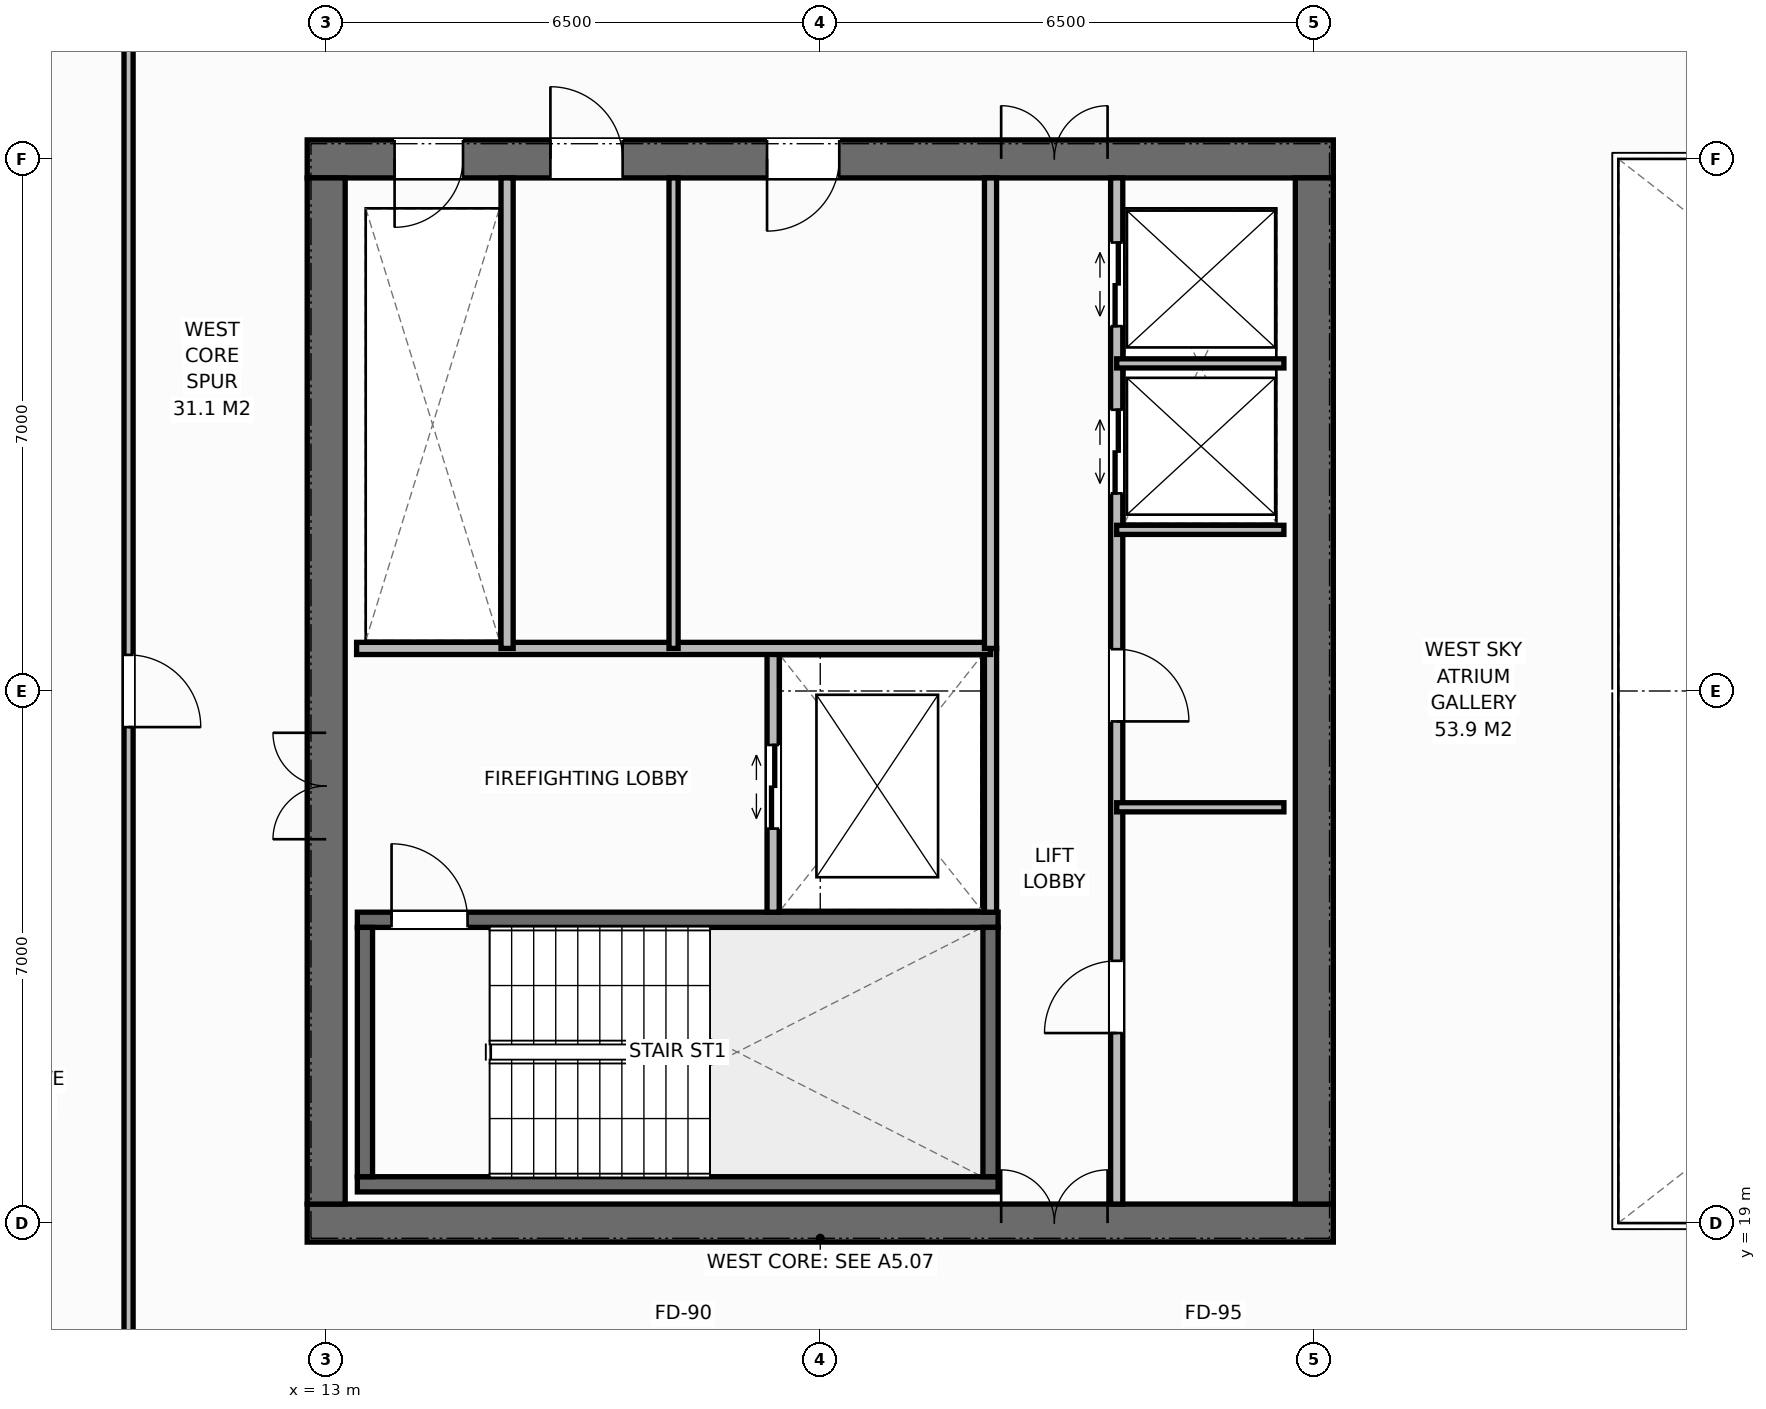
"""IFC4 building model, lengths in metres.
Left out: names, types, materials, properties, quantities, classifications, styles, units other than length and angle.
Written with IfcOpenShell. Run it as: python <this file> out.ifc"""

import sys

from ifc_helpers import new_model, si_unit, direction, frame, frame_2d, origin, place, context, subcontext, project, spatial, rectangle, extrude, element, fill, save


model = new_model("IFC4")
c1 = context("Model", 3, precision=1e-05, world=origin(), true_north=direction((0.0, 1.0)))
c2 = subcontext(c1, "Body", "Model", "MODEL_VIEW")
j1 = project(units=[si_unit("LENGTHUNIT", "METRE"), si_unit("PLANEANGLEUNIT", "RADIAN")], contexts=[c1])
p1 = place(None, origin())
s1 = spatial("IfcSite", under=j1, at=p1, CompositionType="ELEMENT")
p2 = place(p1, origin())
s2 = spatial("IfcBuilding", under=s1, at=p2, CompositionType="ELEMENT")
p3 = place(p2, frame((0.0, 0.0, 270.8)))
s3 = spatial("IfcBuildingStorey", under=s2, at=p3, CompositionType="ELEMENT", Elevation=270.8)
p4 = place(p3, frame((12.75, 19.0, 0.0), z_axis=(0.0, 0.0, 1.0), x_axis=(1.0, 0.0, 0.0)))
e1 = element("IfcWall", 1, at=p4, inside=s3, PredefinedType="SHEAR", context=c2, shape_type="SweptSolid", body=[
    extrude(rectangle(XDim=13.5, YDim=0.5, at=frame_2d((6.75, 0.0))), origin(), (0.0, 0.0, 1.0), 3.8),
])
p5 = place(p4, frame((9.13, 0.0, 0.0)))
e2 = element("IfcOpeningElement", 2, at=p5, cuts=e1, PredefinedType="OPENING", context=c2, shape_type="SweptSolid", body=[
    extrude(rectangle(XDim=1.4, YDim=2.2, at=frame_2d((0.7, 1.1))), frame((0.0, 0.26, 0.0), z_axis=(0.0, -1.0, 0.0), x_axis=(1.0, 0.0, 0.0)), (0.0, 0.0, 1.0), 0.52),
])
p6 = place(p3, frame((12.75, 33.0, 0.0), z_axis=(0.0, 0.0, 1.0), x_axis=(1.0, 0.0, 0.0)))
e3 = element("IfcWall", 3, at=p6, inside=s3, PredefinedType="SHEAR", context=c2, shape_type="SweptSolid", body=[
    extrude(rectangle(XDim=13.5, YDim=0.5, at=frame_2d((6.75, 0.0))), origin(), (0.0, 0.0, 1.0), 3.8),
])
p7 = place(p6, frame((1.15, 0.0, 0.0)))
e4 = element("IfcOpeningElement", 4, at=p7, cuts=e3, PredefinedType="OPENING", context=c2, shape_type="SweptSolid", body=[
    extrude(rectangle(XDim=0.9, YDim=2.15, at=frame_2d((0.45, 1.075))), frame((0.0, 0.26, 0.0), z_axis=(0.0, -1.0, 0.0), x_axis=(1.0, 0.0, 0.0)), (0.0, 0.0, 1.0), 0.52),
])
p8 = place(p6, frame((3.2, 0.0, 0.0)))
e5 = element("IfcOpeningElement", 5, at=p8, cuts=e3, PredefinedType="OPENING", context=c2, shape_type="SweptSolid", body=[
    extrude(rectangle(XDim=0.95, YDim=2.15, at=frame_2d((0.475, 1.075))), frame((0.0, 0.26, 0.0), z_axis=(0.0, -1.0, 0.0), x_axis=(1.0, 0.0, 0.0)), (0.0, 0.0, 1.0), 0.52),
])
p9 = place(p6, frame((6.05, 0.0, 0.0)))
e6 = element("IfcOpeningElement", 6, at=p9, cuts=e3, PredefinedType="OPENING", context=c2, shape_type="SweptSolid", body=[
    extrude(rectangle(XDim=0.95, YDim=2.15, at=frame_2d((0.475, 1.075))), frame((0.0, 0.26, 0.0), z_axis=(0.0, -1.0, 0.0), x_axis=(1.0, 0.0, 0.0)), (0.0, 0.0, 1.0), 0.52),
])
p10 = place(p6, frame((9.13, 0.0, 0.0)))
e7 = element("IfcOpeningElement", 7, at=p10, cuts=e3, PredefinedType="OPENING", context=c2, shape_type="SweptSolid", body=[
    extrude(rectangle(XDim=1.4, YDim=2.2, at=frame_2d((0.7, 1.1))), frame((0.0, 0.26, 0.0), z_axis=(0.0, -1.0, 0.0), x_axis=(1.0, 0.0, 0.0)), (0.0, 0.0, 1.0), 0.52),
])
p11 = place(p3, frame((13.0, 19.25, 0.0), z_axis=(0.0, 0.0, 1.0), x_axis=(0.0, 1.0, 0.0)))
e8 = element("IfcWall", 8, at=p11, inside=s3, PredefinedType="SHEAR", context=c2, shape_type="SweptSolid", body=[
    extrude(rectangle(XDim=13.5, YDim=0.5, at=frame_2d((6.75, 0.0))), origin(), (0.0, 0.0, 1.0), 3.8),
])
p12 = place(p11, frame((4.8, 0.0, 0.0)))
e9 = element("IfcOpeningElement", 9, at=p12, cuts=e8, PredefinedType="OPENING", context=c2, shape_type="SweptSolid", body=[
    extrude(rectangle(XDim=1.4, YDim=2.2, at=frame_2d((0.7, 1.1))), frame((0.0, 0.26, 0.0), z_axis=(0.0, -1.0, 0.0), x_axis=(1.0, 0.0, 0.0)), (0.0, 0.0, 1.0), 0.52),
])
p13 = place(p3, frame((26.0, 19.25, 0.0), z_axis=(0.0, 0.0, 1.0), x_axis=(0.0, 1.0, 0.0)))
e10 = element("IfcWall", 10, at=p13, inside=s3, PredefinedType="SHEAR", context=c2, shape_type="SweptSolid", body=[
    extrude(rectangle(XDim=13.5, YDim=0.5, at=frame_2d((6.75, 0.0))), origin(), (0.0, 0.0, 1.0), 3.8),
])
p14 = place(p3, frame((13.41, 19.51, 0.0), z_axis=(0.0, 0.0, 1.0), x_axis=(1.0, 0.0, 0.0)))
e11 = element("IfcWall", 11, at=p14, inside=s3, PredefinedType="SHEAR", context=c2, shape_type="SweptSolid", body=[
    extrude(rectangle(XDim=8.43, YDim=0.2, at=frame_2d((4.215, 0.0))), origin(), (0.0, 0.0, 1.0), 3.8),
])
p15 = place(p3, frame((13.41, 22.99, 0.0), z_axis=(0.0, 0.0, 1.0), x_axis=(1.0, 0.0, 0.0)))
e12 = element("IfcWall", 12, at=p15, inside=s3, PredefinedType="SHEAR", context=c2, shape_type="SweptSolid", body=[
    extrude(rectangle(XDim=8.43, YDim=0.2, at=frame_2d((4.215, 0.0))), origin(), (0.0, 0.0, 1.0), 3.8),
])
p16 = place(p15, frame((0.45, 0.0, 0.0)))
e13 = element("IfcOpeningElement", 13, at=p16, cuts=e12, PredefinedType="OPENING", context=c2, shape_type="SweptSolid", body=[
    extrude(rectangle(XDim=1.0, YDim=2.15, at=frame_2d((0.5, 1.075))), frame((0.0, 0.11, 0.0), z_axis=(0.0, -1.0, 0.0), x_axis=(1.0, 0.0, 0.0)), (0.0, 0.0, 1.0), 0.22),
])
for number, where, z_axis, x_axis in (
    (14, (13.51, 19.61, 0.0), (0.0, 0.0, 1.0), (0.0, 1.0, 0.0)),
    (15, (21.74, 19.61, 0.0), (0.0, 0.0, 1.0), (0.0, 1.0, 0.0)),
):
    element("IfcWall", number, at=place(p3, frame(where, z_axis=z_axis, x_axis=x_axis)), inside=s3, PredefinedType="SHEAR", context=c2, shape_type="SweptSolid", body=[
        extrude(rectangle(XDim=3.28, YDim=0.2, at=frame_2d((1.64, 0.0))), origin(), (0.0, 0.0, 1.0), 3.8),
    ])
p17 = place(p3, frame((21.74, 23.09, 0.0), z_axis=(0.0, 0.0, 1.0), x_axis=(0.0, 1.0, 0.0)))
e16 = element("IfcWall", 16, at=p17, inside=s3, PredefinedType="STANDARD", context=c2, shape_type="SweptSolid", body=[
    extrude(rectangle(XDim=3.47, YDim=0.16, at=frame_2d((1.735, 0.0))), origin(), (0.0, 0.0, 1.0), 3.588),
])
p18 = place(p3, frame((18.88, 23.09, 0.0), z_axis=(0.0, 0.0, 1.0), x_axis=(0.0, 1.0, 0.0)))
e17 = element("IfcWall", 17, at=p18, inside=s3, PredefinedType="STANDARD", context=c2, shape_type="SweptSolid", body=[
    extrude(rectangle(XDim=3.47, YDim=0.16, at=frame_2d((1.735, 0.0))), origin(), (0.0, 0.0, 1.0), 3.588),
])
p19 = place(p18, frame((1.1, 0.0, 0.0)))
e18 = element("IfcOpeningElement", 18, at=p19, cuts=e17, PredefinedType="OPENING", context=c2, shape_type="SweptSolid", body=[
    extrude(rectangle(XDim=1.1, YDim=2.2, at=frame_2d((0.55, 1.1))), frame((0.0, 0.09, 0.0), z_axis=(0.0, -1.0, 0.0), x_axis=(1.0, 0.0, 0.0)), (0.0, 0.0, 1.0), 0.18),
])
p20 = place(p3, frame((13.4, 26.56, 0.0), z_axis=(0.0, 0.0, 1.0), x_axis=(1.0, 0.0, 0.0)))
e19 = element("IfcWall", 19, at=p20, inside=s3, PredefinedType="STANDARD", context=c2, shape_type="SweptSolid", body=[
    extrude(rectangle(XDim=8.34, YDim=0.16, at=frame_2d((4.17, 0.0))), origin(), (0.0, 0.0, 1.0), 3.588),
])
p21 = place(p3, frame((15.38, 26.56, 0.0), z_axis=(0.0, 0.0, 1.0), x_axis=(0.0, 1.0, 0.0)))
e20 = element("IfcWall", 20, at=p21, inside=s3, PredefinedType="STANDARD", context=c2, shape_type="SweptSolid", body=[
    extrude(rectangle(XDim=6.19, YDim=0.16, at=frame_2d((3.095, 0.0))), origin(), (0.0, 0.0, 1.0), 3.588),
])
p22 = place(p3, frame((17.57, 26.56, 0.0), z_axis=(0.0, 0.0, 1.0), x_axis=(0.0, 1.0, 0.0)))
e21 = element("IfcWall", 21, at=p22, inside=s3, PredefinedType="PARTITIONING", context=c2, shape_type="SweptSolid", body=[
    extrude(rectangle(XDim=6.19, YDim=0.12, at=frame_2d((3.095, 0.0))), origin(), (0.0, 0.0, 1.0), 3.588),
])
p23 = place(p3, frame((21.74, 26.56, 0.0), z_axis=(0.0, 0.0, 1.0), x_axis=(0.0, 1.0, 0.0)))
e22 = element("IfcWall", 22, at=p23, inside=s3, PredefinedType="STANDARD", context=c2, shape_type="SweptSolid", body=[
    extrude(rectangle(XDim=6.19, YDim=0.16, at=frame_2d((3.095, 0.0))), origin(), (0.0, 0.0, 1.0), 3.588),
])
p24 = place(p3, frame((23.4, 19.25, 0.0), z_axis=(0.0, 0.0, 1.0), x_axis=(0.0, 1.0, 0.0)))
e23 = element("IfcWall", 23, at=p24, inside=s3, PredefinedType="STANDARD", context=c2, shape_type="SweptSolid", body=[
    extrude(rectangle(XDim=13.5, YDim=0.16, at=frame_2d((6.75, 0.0))), origin(), (0.0, 0.0, 1.0), 3.588),
])
p25 = place(p24, frame((2.25, 0.0, 0.0)))
e24 = element("IfcOpeningElement", 24, at=p25, cuts=e23, PredefinedType="OPENING", context=c2, shape_type="SweptSolid", body=[
    extrude(rectangle(XDim=0.95, YDim=2.15, at=frame_2d((0.475, 1.075))), frame((0.0, 0.09, 0.0), z_axis=(0.0, -1.0, 0.0), x_axis=(1.0, 0.0, 0.0)), (0.0, 0.0, 1.0), 0.18),
])
p26 = place(p24, frame((6.35, 0.0, 0.0)))
e25 = element("IfcOpeningElement", 25, at=p26, cuts=e23, PredefinedType="OPENING", context=c2, shape_type="SweptSolid", body=[
    extrude(rectangle(XDim=0.95, YDim=2.15, at=frame_2d((0.475, 1.075))), frame((0.0, 0.09, 0.0), z_axis=(0.0, -1.0, 0.0), x_axis=(1.0, 0.0, 0.0)), (0.0, 0.0, 1.0), 0.18),
])
p27 = place(p24, frame((9.35, 0.0, 0.0)))
e26 = element("IfcOpeningElement", 26, at=p27, cuts=e23, PredefinedType="OPENING", context=c2, shape_type="SweptSolid", body=[
    extrude(rectangle(XDim=1.1, YDim=2.2, at=frame_2d((0.55, 1.1))), frame((0.0, 0.09, 0.0), z_axis=(0.0, -1.0, 0.0), x_axis=(1.0, 0.0, 0.0)), (0.0, 0.0, 1.0), 0.18),
])
p28 = place(p24, frame((11.55, 0.0, 0.0)))
e27 = element("IfcOpeningElement", 27, at=p28, cuts=e23, PredefinedType="OPENING", context=c2, shape_type="SweptSolid", body=[
    extrude(rectangle(XDim=1.1, YDim=2.2, at=frame_2d((0.55, 1.1))), frame((0.0, 0.09, 0.0), z_axis=(0.0, -1.0, 0.0), x_axis=(1.0, 0.0, 0.0)), (0.0, 0.0, 1.0), 0.18),
])
for number, where, z_axis, x_axis in (
    (28, (23.4, 24.47, 0.0), (0.0, 0.0, 1.0), (1.0, 0.0, 0.0)),
    (29, (23.4, 28.12, 0.0), (0.0, 0.0, 1.0), (1.0, 0.0, 0.0)),
    (30, (23.4, 30.31, 0.0), (0.0, 0.0, 1.0), (1.0, 0.0, 0.0)),
):
    element("IfcWall", number, at=place(p3, frame(where, z_axis=z_axis, x_axis=x_axis)), inside=s3, PredefinedType="PARTITIONING", context=c2, shape_type="SweptSolid", body=[
        extrude(rectangle(XDim=2.2, YDim=0.12, at=frame_2d((1.1, 0.0))), origin(), (0.0, 0.0, 1.0), 3.588),
    ])
p29 = place(p3, frame((10.4, 16.5, 0.0), z_axis=(0.0, 0.0, 1.0), x_axis=(0.0, 1.0, 0.0)))
e31 = element("IfcWall", 31, at=p29, inside=s3, PredefinedType="PARTITIONING", context=c2, shape_type="SweptSolid", body=[
    extrude(rectangle(XDim=19.0, YDim=0.12, at=frame_2d((9.5, 0.0))), origin(), (0.0, 0.0, 1.0), 3.588),
])
p30 = place(p29, frame((9.025, 0.0, 0.0)))
e32 = element("IfcOpeningElement", 32, at=p30, cuts=e31, PredefinedType="OPENING", context=c2, shape_type="SweptSolid", body=[
    extrude(rectangle(XDim=0.95, YDim=2.15, at=frame_2d((0.475, 1.075))), frame((0.0, 0.07, 0.0), z_axis=(0.0, -1.0, 0.0), x_axis=(1.0, 0.0, 0.0)), (0.0, 0.0, 1.0), 0.14),
])
p31 = place(p16, origin())
e33 = element("IfcDoor", 33, at=p31, inside=s3, OperationType="SINGLE_SWING_LEFT", PredefinedType="DOOR", context=c2, shape_type="SweptSolid", body=[
    extrude(rectangle(XDim=1.0, YDim=2.15, at=frame_2d((0.5, 1.075))), frame((0.0, 0.025, 0.0), z_axis=(0.0, -1.0, 0.0), x_axis=(1.0, 0.0, 0.0)), (0.0, 0.0, 1.0), 0.05),
])
fill(e13, e33)
p32 = place(p12, origin())
e34 = element("IfcDoor", 34, at=p32, inside=s3, OperationType="DOUBLE_DOOR_SINGLE_SWING", PredefinedType="DOOR", context=c2, shape_type="SweptSolid", body=[
    extrude(rectangle(XDim=1.4, YDim=2.2, at=frame_2d((0.7, 1.1))), frame((0.0, 0.025, 0.0), z_axis=(0.0, -1.0, 0.0), x_axis=(1.0, 0.0, 0.0)), (0.0, 0.0, 1.0), 0.05),
])
fill(e9, e34)
p33 = place(p19, origin())
e35 = element("IfcDoor", 35, at=p33, inside=s3, OperationType="DOUBLE_DOOR_SLIDING", PredefinedType="DOOR", context=c2, shape_type="SweptSolid", body=[
    extrude(rectangle(XDim=1.1, YDim=2.2, at=frame_2d((0.55, 1.1))), frame((0.0, 0.025, 0.0), z_axis=(0.0, -1.0, 0.0), x_axis=(1.0, 0.0, 0.0)), (0.0, 0.0, 1.0), 0.05),
])
fill(e18, e35)
p34 = place(p7, origin())
e36 = element("IfcDoor", 36, at=p34, inside=s3, OperationType="SINGLE_SWING_RIGHT", PredefinedType="DOOR", context=c2, shape_type="SweptSolid", body=[
    extrude(rectangle(XDim=0.9, YDim=2.15, at=frame_2d((0.45, 1.075))), frame((0.0, -0.025, 0.0), z_axis=(0.0, -1.0, 0.0), x_axis=(1.0, 0.0, 0.0)), (0.0, 0.0, 1.0), 0.05),
])
fill(e4, e36)
p35 = place(p8, origin())
e37 = element("IfcDoor", 37, at=p35, inside=s3, OperationType="SINGLE_SWING_LEFT", PredefinedType="DOOR", context=c2, shape_type="SweptSolid", body=[
    extrude(rectangle(XDim=0.95, YDim=2.15, at=frame_2d((0.475, 1.075))), frame((0.0, -0.025, 0.0), z_axis=(0.0, -1.0, 0.0), x_axis=(1.0, 0.0, 0.0)), (0.0, 0.0, 1.0), 0.05),
])
fill(e5, e37)
p36 = place(p9, origin())
e38 = element("IfcDoor", 38, at=p36, inside=s3, OperationType="SINGLE_SWING_RIGHT", PredefinedType="DOOR", context=c2, shape_type="SweptSolid", body=[
    extrude(rectangle(XDim=0.95, YDim=2.15, at=frame_2d((0.475, 1.075))), frame((0.0, -0.025, 0.0), z_axis=(0.0, -1.0, 0.0), x_axis=(1.0, 0.0, 0.0)), (0.0, 0.0, 1.0), 0.05),
])
fill(e6, e38)
p37 = place(p5, origin())
e39 = element("IfcDoor", 39, at=p37, inside=s3, OperationType="DOUBLE_DOOR_SINGLE_SWING", PredefinedType="DOOR", context=c2, shape_type="SweptSolid", body=[
    extrude(rectangle(XDim=1.4, YDim=2.2, at=frame_2d((0.7, 1.1))), frame((0.0, 0.075, 0.0), z_axis=(0.0, -1.0, 0.0), x_axis=(1.0, 0.0, 0.0)), (0.0, 0.0, 1.0), 0.05),
])
fill(e2, e39)
p38 = place(p10, origin())
e40 = element("IfcDoor", 40, at=p38, inside=s3, OperationType="DOUBLE_DOOR_SINGLE_SWING", PredefinedType="DOOR", context=c2, shape_type="SweptSolid", body=[
    extrude(rectangle(XDim=1.4, YDim=2.2, at=frame_2d((0.7, 1.1))), frame((0.0, -0.025, 0.0), z_axis=(0.0, -1.0, 0.0), x_axis=(1.0, 0.0, 0.0)), (0.0, 0.0, 1.0), 0.05),
])
fill(e7, e40)
p39 = place(p25, origin())
e41 = element("IfcDoor", 41, at=p39, inside=s3, OperationType="SINGLE_SWING_LEFT", PredefinedType="DOOR", context=c2, shape_type="SweptSolid", body=[
    extrude(rectangle(XDim=0.95, YDim=2.15, at=frame_2d((0.475, 1.075))), frame((0.0, 0.025, 0.0), z_axis=(0.0, -1.0, 0.0), x_axis=(1.0, 0.0, 0.0)), (0.0, 0.0, 1.0), 0.05),
])
fill(e24, e41)
p40 = place(p26, origin())
e42 = element("IfcDoor", 42, at=p40, inside=s3, OperationType="SINGLE_SWING_RIGHT", PredefinedType="DOOR", context=c2, shape_type="SweptSolid", body=[
    extrude(rectangle(XDim=0.95, YDim=2.15, at=frame_2d((0.475, 1.075))), frame((0.0, 0.025, 0.0), z_axis=(0.0, -1.0, 0.0), x_axis=(1.0, 0.0, 0.0)), (0.0, 0.0, 1.0), 0.05),
])
fill(e25, e42)
p41 = place(p27, origin())
e43 = element("IfcDoor", 43, at=p41, inside=s3, OperationType="DOUBLE_DOOR_SLIDING", PredefinedType="DOOR", context=c2, shape_type="SweptSolid", body=[
    extrude(rectangle(XDim=1.1, YDim=2.2, at=frame_2d((0.55, 1.1))), frame((0.0, 0.025, 0.0), z_axis=(0.0, -1.0, 0.0), x_axis=(1.0, 0.0, 0.0)), (0.0, 0.0, 1.0), 0.05),
])
fill(e26, e43)
p42 = place(p28, origin())
e44 = element("IfcDoor", 44, at=p42, inside=s3, OperationType="DOUBLE_DOOR_SLIDING", PredefinedType="DOOR", context=c2, shape_type="SweptSolid", body=[
    extrude(rectangle(XDim=1.1, YDim=2.2, at=frame_2d((0.55, 1.1))), frame((0.0, 0.025, 0.0), z_axis=(0.0, -1.0, 0.0), x_axis=(1.0, 0.0, 0.0)), (0.0, 0.0, 1.0), 0.05),
])
fill(e27, e44)
p43 = place(p30, origin())
e45 = element("IfcDoor", 45, at=p43, inside=s3, OperationType="SINGLE_SWING_RIGHT", PredefinedType="DOOR", context=c2, shape_type="SweptSolid", body=[
    extrude(rectangle(XDim=0.95, YDim=2.15, at=frame_2d((0.475, 1.075))), frame((0.0, 0.025, 0.0), z_axis=(0.0, -1.0, 0.0), x_axis=(1.0, 0.0, 0.0)), (0.0, 0.0, 1.0), 0.05),
])
fill(e32, e45)
save(model, sys.argv[1])
